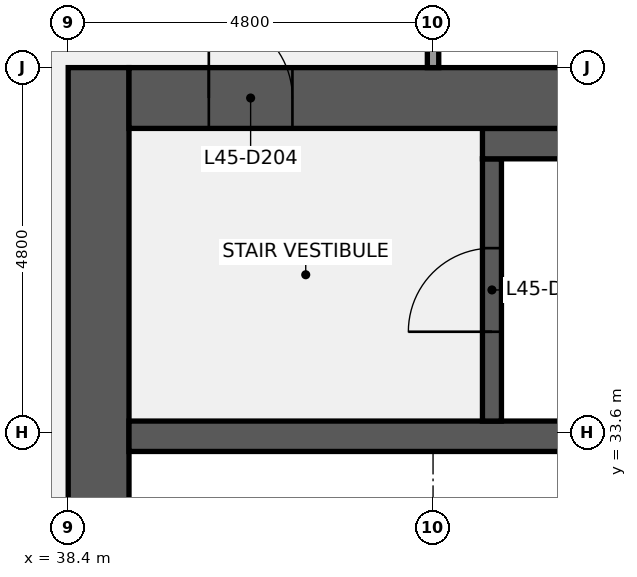
"""IFC4 building model, lengths in metres.
Left out: names, types, materials, properties, quantities, classifications, styles, units other than length and angle.
Written with IfcOpenShell. Run it as: python <this file> out.ifc"""

import sys

from ifc_helpers import new_model, si_unit, direction, frame, frame_2d, origin, place, context, subcontext, project, spatial, rectangle, extrude, element, fill, save


model = new_model("IFC4")
c1 = context("Model", 3, precision=1e-05, world=origin(), true_north=direction((0.0, 1.0)))
c2 = subcontext(c1, "Body", "Model", "MODEL_VIEW")
j1 = project(units=[si_unit("LENGTHUNIT", "METRE"), si_unit("PLANEANGLEUNIT", "RADIAN")], contexts=[c1])
p1 = place(None, origin())
s1 = spatial("IfcSite", under=j1, at=p1, CompositionType="ELEMENT")
p2 = place(p1, origin())
s2 = spatial("IfcBuilding", under=s1, at=p2, CompositionType="ELEMENT")
p3 = place(p2, frame((0.0, 0.0, 209.2)))
s3 = spatial("IfcBuildingStorey", under=s2, at=p3, CompositionType="ELEMENT", Elevation=209.2)
p4 = place(p3, frame((38.8, 9.6, 0.0), z_axis=(0.0, 0.0, 1.0), x_axis=(0.0, 1.0, 0.0)))
e1 = element("IfcWall", 1, at=p4, inside=s3, PredefinedType="SHEAR", context=c2, shape_type="SweptSolid", body=[
    extrude(rectangle(XDim=28.8, YDim=0.8, at=frame_2d((14.4, 0.0))), origin(), (0.0, 0.0, 1.0), 3.84),
])
p5 = place(p4, frame((8.7, 0.0, 0.0)))
e2 = element("IfcOpeningElement", 2, at=p5, cuts=e1, PredefinedType="OPENING", context=c2, shape_type="SweptSolid", body=[
    extrude(rectangle(XDim=1.8, YDim=2.1, at=frame_2d((0.9, 1.05))), frame((0.0, 0.41, 0.0), z_axis=(0.0, -1.0, 0.0), x_axis=(1.0, 0.0, 0.0)), (0.0, 0.0, 1.0), 0.82),
])
p6 = place(p4, frame((18.3, 0.0, 0.0)))
e3 = element("IfcOpeningElement", 3, at=p6, cuts=e1, PredefinedType="OPENING", context=c2, shape_type="SweptSolid", body=[
    extrude(rectangle(XDim=1.8, YDim=2.1, at=frame_2d((0.9, 1.05))), frame((0.0, 0.41, 0.0), z_axis=(0.0, -1.0, 0.0), x_axis=(1.0, 0.0, 0.0)), (0.0, 0.0, 1.0), 0.82),
])
p7 = place(p3, frame((39.2, 33.55, 0.0), z_axis=(0.0, 0.0, 1.0), x_axis=(1.0, 0.0, 0.0)))
e4 = element("IfcWall", 4, at=p7, inside=s3, PredefinedType="SHEAR", context=c2, shape_type="SweptSolid", body=[
    extrude(rectangle(XDim=17.6, YDim=0.4, at=frame_2d((8.8, 0.0))), origin(), (0.0, 0.0, 1.0), 3.84),
])
p8 = place(p3, frame((43.975, 33.75, 0.0), z_axis=(0.0, 0.0, 1.0), x_axis=(0.0, 1.0, 0.0)))
e5 = element("IfcWall", 5, at=p8, inside=s3, PredefinedType="SHEAR", context=c2, shape_type="SweptSolid", body=[
    extrude(rectangle(XDim=3.45, YDim=0.25, at=frame_2d((1.725, 0.0))), origin(), (0.0, 0.0, 1.0), 3.84),
])
p9 = place(p8, frame((1.175, 0.0, 0.0)))
e6 = element("IfcOpeningElement", 6, at=p9, cuts=e5, PredefinedType="OPENING", context=c2, shape_type="SweptSolid", body=[
    extrude(rectangle(XDim=1.1, YDim=2.1, at=frame_2d((0.55, 1.05))), frame((0.0, 0.135, 0.0), z_axis=(0.0, -1.0, 0.0), x_axis=(1.0, 0.0, 0.0)), (0.0, 0.0, 1.0), 0.27),
])
p10 = place(p3, frame((43.85, 37.4, 0.0), z_axis=(0.0, 0.0, 1.0), x_axis=(1.0, 0.0, 0.0)))
e7 = element("IfcWall", 7, at=p10, inside=s3, PredefinedType="SHEAR", context=c2, shape_type="SweptSolid", body=[
    extrude(rectangle(XDim=4.15, YDim=0.4, at=frame_2d((2.075, 0.0))), origin(), (0.0, 0.0, 1.0), 3.84),
])
p11 = place(p3, frame((39.2, 38.0, 0.0), z_axis=(0.0, 0.0, 1.0), x_axis=(1.0, 0.0, 0.0)))
e8 = element("IfcWall", 8, at=p11, inside=s3, PredefinedType="SHEAR", context=c2, shape_type="SweptSolid", body=[
    extrude(rectangle(XDim=8.8, YDim=0.8, at=frame_2d((4.4, 0.0))), origin(), (0.0, 0.0, 1.0), 3.84),
])
p12 = place(p11, frame((1.05, 0.0, 0.0)))
e9 = element("IfcOpeningElement", 9, at=p12, cuts=e8, PredefinedType="OPENING", context=c2, shape_type="SweptSolid", body=[
    extrude(rectangle(XDim=1.1, YDim=2.1, at=frame_2d((0.55, 1.05))), frame((0.0, 0.41, 0.0), z_axis=(0.0, -1.0, 0.0), x_axis=(1.0, 0.0, 0.0)), (0.0, 0.0, 1.0), 0.82),
])
p13 = place(p3, frame((43.2, 38.4, 0.0), z_axis=(0.0, 0.0, 1.0), x_axis=(0.0, 1.0, 0.0)))
e10 = element("IfcWall", 10, at=p13, inside=s3, PredefinedType="PARTITIONING", context=c2, shape_type="SweptSolid", body=[
    extrude(rectangle(XDim=2.325, YDim=0.15, at=frame_2d((1.163, 0.0))), origin(), (0.0, 0.0, 1.0), 2.87),
])
p14 = place(p13, frame((0.663, 0.0, 0.0)))
e11 = element("IfcOpeningElement", 11, at=p14, cuts=e10, PredefinedType="OPENING", context=c2, shape_type="SweptSolid", body=[
    extrude(rectangle(XDim=1.0, YDim=2.1, at=frame_2d((0.5, 1.05))), frame((0.0, 0.085, 0.0), z_axis=(0.0, -1.0, 0.0), x_axis=(1.0, 0.0, 0.0)), (0.0, 0.0, 1.0), 0.17),
])
p15 = place(p9, origin())
e12 = element("IfcDoor", 12, at=p15, inside=s3, OperationType="SINGLE_SWING_LEFT", PredefinedType="DOOR", context=c2, shape_type="SweptSolid", body=[
    extrude(rectangle(XDim=1.1, YDim=2.1, at=frame_2d((0.55, 1.05))), frame((0.0, 0.025, 0.0), z_axis=(0.0, -1.0, 0.0), x_axis=(1.0, 0.0, 0.0)), (0.0, 0.0, 1.0), 0.05),
])
fill(e6, e12)
p16 = place(p12, origin())
e13 = element("IfcDoor", 13, at=p16, inside=s3, OperationType="SINGLE_SWING_LEFT", PredefinedType="DOOR", context=c2, shape_type="SweptSolid", body=[
    extrude(rectangle(XDim=1.1, YDim=2.1, at=frame_2d((0.55, 1.05))), frame((0.0, 0.025, 0.0), z_axis=(0.0, -1.0, 0.0), x_axis=(1.0, 0.0, 0.0)), (0.0, 0.0, 1.0), 0.05),
])
fill(e9, e13)
save(model, sys.argv[1])
